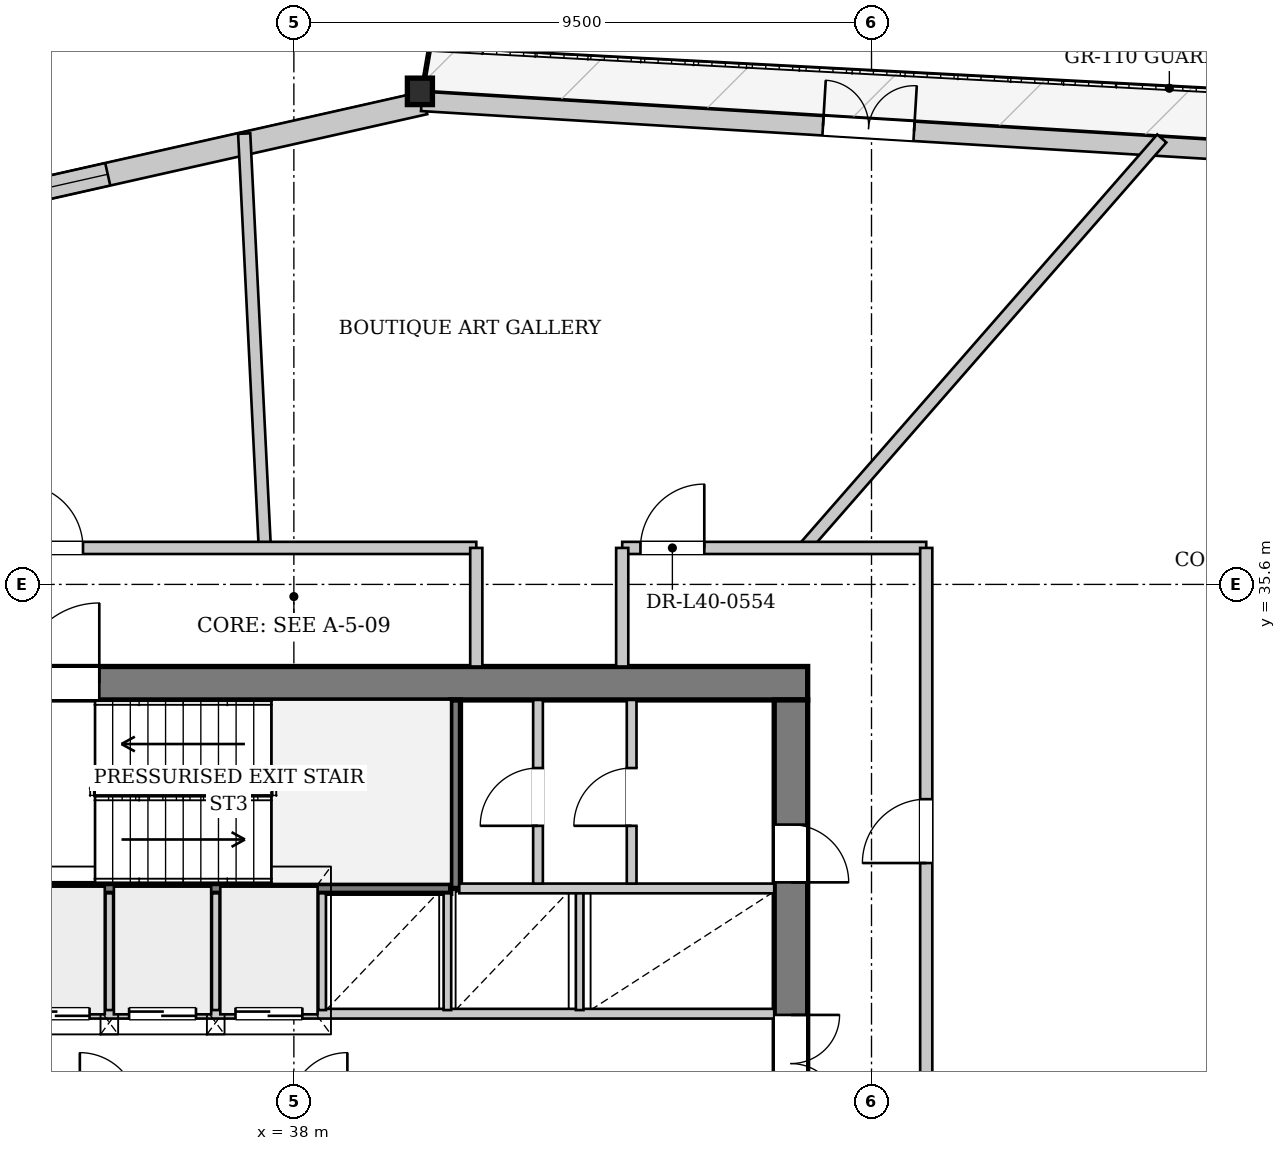
"""IFC4 building model, lengths in metres.
Left out: names, types, materials, properties, quantities, classifications, styles, units other than length and angle.
Written with IfcOpenShell. Run it as: python <this file> out.ifc"""

import sys

from ifc_helpers import new_model, si_unit, direction, frame, frame_2d, origin, origin_2d, place, context, subcontext, project, spatial, rectangle, i_section, extrude, source, transform, mapped, element, fill, save


model = new_model("IFC4")
c1 = context("Model", 3, precision=1e-05, world=origin(), true_north=direction((0.0, 1.0)))
c2 = subcontext(c1, "Body", "Model", "MODEL_VIEW")
j1 = project(units=[si_unit("LENGTHUNIT", "METRE"), si_unit("PLANEANGLEUNIT", "RADIAN")], contexts=[c1])
p1 = place(None, origin())
s1 = spatial("IfcSite", under=j1, at=p1, CompositionType="ELEMENT")
p2 = place(p1, origin())
s2 = spatial("IfcBuilding", under=s1, at=p2, CompositionType="ELEMENT")
p3 = place(p2, frame((0.0, 0.0, 153.7)))
s3 = spatial("IfcBuildingStorey", under=s2, at=p3, CompositionType="ELEMENT", Elevation=153.7)
m1 = source(origin(), c2, "Body", "SweptSolid", [
    extrude(i_section(OverallWidth=0.412, OverallDepth=0.435, WebThickness=0.031, FlangeThickness=0.05, at=origin_2d()), origin(), (0.0, 0.0, 1.0), 3.386),
])
p4 = place(p3, frame((40.11, 43.704, 0.0), z_axis=(-0.022064508815, 0.002667930804, 0.999752989291), x_axis=(-0.120040692713, -0.992768972165, 0.0)))
e1 = element("IfcColumn", 1, at=p4, inside=s3, PredefinedType="COLUMN", context=c2, shape_type="MappedRepresentation", body=[
    mapped(m1, transform((0.0, 0.0, 0.0), x_axis=(1.0, 0.0, 0.0), y_axis=(0.0, 1.0, 0.0), z_axis=(0.0, 0.0, 1.0), scale=1.0)),
])
p5 = place(p3, frame((17.7, 38.464, 0.0), z_axis=(0.0, 0.0, 1.0), x_axis=(0.975581235483, 0.21963891498, 0.0)))
e2 = element("IfcWall", 2, at=p5, inside=s3, PredefinedType="SOLIDWALL", context=c2, shape_type="SweptSolid", body=[
    extrude(rectangle(XDim=23.014, YDim=0.38, at=frame_2d((11.507, 0.0))), origin(), (0.0, 0.0, 1.0), 2.692),
])
p6 = place(p5, frame((5.344, 0.0, 0.322)))
e3 = element("IfcOpeningElement", 3, at=p6, cuts=e2, PredefinedType="OPENING", context=c2, shape_type="SweptSolid", body=[
    extrude(rectangle(XDim=2.2, YDim=2.25, at=frame_2d((1.1, 1.125))), frame((0.0, 0.2, 0.0), z_axis=(0.0, -1.0, 0.0), x_axis=(1.0, 0.0, 0.0)), (0.0, 0.0, 1.0), 0.4),
])
p7 = place(p5, frame((15.47, 0.0, 0.322)))
e4 = element("IfcOpeningElement", 4, at=p7, cuts=e2, PredefinedType="OPENING", context=c2, shape_type="SweptSolid", body=[
    extrude(rectangle(XDim=2.2, YDim=2.25, at=frame_2d((1.1, 1.125))), frame((0.0, 0.2, 0.0), z_axis=(0.0, -1.0, 0.0), x_axis=(1.0, 0.0, 0.0)), (0.0, 0.0, 1.0), 0.4),
])
p8 = place(p3, frame((40.1, 43.544, 0.0), z_axis=(0.0, 0.0, 1.0), x_axis=(0.99815464943, -0.060723107805, 0.0)))
e5 = element("IfcWall", 5, at=p8, inside=s3, PredefinedType="SOLIDWALL", context=c2, shape_type="SweptSolid", body=[
    extrude(rectangle(XDim=23.014, YDim=0.32, at=frame_2d((11.507, 0.0))), origin(), (0.0, 0.0, 1.0), 2.692),
])
p9 = place(p8, frame((6.614, 0.0, 0.0)))
e6 = element("IfcOpeningElement", 6, at=p9, cuts=e5, PredefinedType="OPENING", context=c2, shape_type="SweptSolid", body=[
    extrude(rectangle(XDim=1.5, YDim=2.3, at=frame_2d((0.75, 1.15))), frame((0.0, 0.17, 0.0), z_axis=(0.0, -1.0, 0.0), x_axis=(1.0, 0.0, 0.0)), (0.0, 0.0, 1.0), 0.34),
])
p10 = place(p8, frame((15.73, 0.0, 0.25)))
e7 = element("IfcOpeningElement", 7, at=p10, cuts=e5, PredefinedType="OPENING", context=c2, shape_type="SweptSolid", body=[
    extrude(rectangle(XDim=2.6, YDim=2.35, at=frame_2d((1.3, 1.175))), frame((0.0, 0.17, 0.0), z_axis=(0.0, -1.0, 0.0), x_axis=(1.0, 0.0, 0.0)), (0.0, 0.0, 1.0), 0.34),
])
p11 = place(p3, frame((64.604, 39.268, 0.0), z_axis=(0.0, 0.0, 1.0), x_axis=(-0.501770576444, -0.865000744864, 0.0)))
e8 = element("IfcWall", 8, at=p11, inside=s3, PredefinedType="SOLIDWALL", context=c2, shape_type="SweptSolid", body=[
    extrude(rectangle(XDim=23.598, YDim=0.38, at=frame_2d((11.799, 0.0))), origin(), (0.0, 0.0, 1.0), 2.692),
])
p12 = place(p11, frame((5.507, 0.0, 0.322)))
e9 = element("IfcOpeningElement", 9, at=p12, cuts=e8, PredefinedType="OPENING", context=c2, shape_type="SweptSolid", body=[
    extrude(rectangle(XDim=2.2, YDim=2.25, at=frame_2d((1.1, 1.125))), frame((0.0, 0.2, 0.0), z_axis=(0.0, -1.0, 0.0), x_axis=(1.0, 0.0, 0.0)), (0.0, 0.0, 1.0), 0.4),
])
p13 = place(p11, frame((15.891, 0.0, 0.322)))
e10 = element("IfcOpeningElement", 10, at=p13, cuts=e8, PredefinedType="OPENING", context=c2, shape_type="SweptSolid", body=[
    extrude(rectangle(XDim=2.2, YDim=2.25, at=frame_2d((1.1, 1.125))), frame((0.0, 0.2, 0.0), z_axis=(0.0, -1.0, 0.0), x_axis=(1.0, 0.0, 0.0)), (0.0, 0.0, 1.0), 0.4),
])
p14 = place(p3, frame((29.55, 33.975, 0.0), z_axis=(0.0, 0.0, 1.0), x_axis=(1.0, 0.0, 0.0)))
e11 = element("IfcWall", 11, at=p14, inside=s3, PredefinedType="SHEAR", context=c2, shape_type="SweptSolid", body=[
    extrude(rectangle(XDim=16.9, YDim=0.55, at=frame_2d((8.45, 0.0))), origin(), (0.0, 0.0, 1.0), 3.3),
])
p15 = place(p14, frame((1.55, 0.0, 0.0)))
e12 = element("IfcOpeningElement", 12, at=p15, cuts=e11, PredefinedType="OPENING", context=c2, shape_type="SweptSolid", body=[
    extrude(rectangle(XDim=0.95, YDim=2.1, at=frame_2d((0.475, 1.05))), frame((0.0, 0.285, 0.0), z_axis=(0.0, -1.0, 0.0), x_axis=(1.0, 0.0, 0.0)), (0.0, 0.0, 1.0), 0.57),
])
p16 = place(p14, frame((3.93, 0.0, 0.0)))
e13 = element("IfcOpeningElement", 13, at=p16, cuts=e11, PredefinedType="OPENING", context=c2, shape_type="SweptSolid", body=[
    extrude(rectangle(XDim=1.32, YDim=2.2, at=frame_2d((0.66, 1.1))), frame((0.0, 0.285, 0.0), z_axis=(0.0, -1.0, 0.0), x_axis=(1.0, 0.0, 0.0)), (0.0, 0.0, 1.0), 0.57),
])
p17 = place(p3, frame((46.175, 33.7, 0.0), z_axis=(0.0, 0.0, 1.0), x_axis=(0.0, -1.0, 0.0)))
e14 = element("IfcWall", 14, at=p17, inside=s3, PredefinedType="SHEAR", context=c2, shape_type="SweptSolid", body=[
    extrude(rectangle(XDim=14.2, YDim=0.55, at=frame_2d((7.1, 0.0))), origin(), (0.0, 0.0, 1.0), 3.3),
])
p18 = place(p17, frame((5.18, 0.0, 0.0)))
e15 = element("IfcOpeningElement", 15, at=p18, cuts=e14, PredefinedType="OPENING", context=c2, shape_type="SweptSolid", body=[
    extrude(rectangle(XDim=1.6, YDim=2.2, at=frame_2d((0.8, 1.1))), frame((0.0, 0.285, 0.0), z_axis=(0.0, -1.0, 0.0), x_axis=(1.0, 0.0, 0.0)), (0.0, 0.0, 1.0), 0.57),
])
p19 = place(p17, frame((2.05, 0.0, 0.0)))
e16 = element("IfcOpeningElement", 16, at=p19, cuts=e14, PredefinedType="OPENING", context=c2, shape_type="SweptSolid", body=[
    extrude(rectangle(XDim=0.95, YDim=2.1, at=frame_2d((0.475, 1.05))), frame((0.0, 0.285, 0.0), z_axis=(0.0, -1.0, 0.0), x_axis=(1.0, 0.0, 0.0)), (0.0, 0.0, 1.0), 0.57),
])
p20 = place(p3, frame((33.28, 30.6, 0.0), z_axis=(0.0, 0.0, 1.0), x_axis=(1.0, 0.0, 0.0)))
e17 = element("IfcWall", 17, at=p20, inside=s3, PredefinedType="PARTITIONING", context=c2, shape_type="SweptSolid", body=[
    extrude(rectangle(XDim=7.3, YDim=0.16, at=frame_2d((3.65, 0.0))), origin(), (0.0, 0.0, 1.0), 3.3),
])
p21 = place(p3, frame((40.66, 30.6, 0.0), z_axis=(0.0, 0.0, 1.0), x_axis=(0.0, 1.0, 0.0)))
e18 = element("IfcWall", 18, at=p21, inside=s3, PredefinedType="PARTITIONING", context=c2, shape_type="SweptSolid", body=[
    extrude(rectangle(XDim=3.1, YDim=0.16, at=frame_2d((1.55, 0.0))), origin(), (0.0, 0.0, 1.0), 3.3),
])
p22 = place(p3, frame((33.28, 28.54, 0.0), z_axis=(0.0, 0.0, 1.0), x_axis=(1.0, 0.0, 0.0)))
e19 = element("IfcWall", 19, at=p22, inside=s3, PredefinedType="PARTITIONING", context=c2, shape_type="SweptSolid", body=[
    extrude(rectangle(XDim=12.62, YDim=0.16, at=frame_2d((6.31, 0.0))), origin(), (0.0, 0.0, 1.0), 3.3),
])
p23 = place(p22, frame((0.26, 0.0, 0.0)))
e20 = element("IfcOpeningElement", 20, at=p23, cuts=e19, PredefinedType="OPENING", context=c2, shape_type="SweptSolid", body=[
    extrude(rectangle(XDim=1.1, YDim=2.2, at=frame_2d((0.55, 1.1))), frame((0.0, 0.09, 0.0), z_axis=(0.0, -1.0, 0.0), x_axis=(1.0, 0.0, 0.0)), (0.0, 0.0, 1.0), 0.18),
])
p24 = place(p22, frame((2.01, 0.0, 0.0)))
e21 = element("IfcOpeningElement", 21, at=p24, cuts=e19, PredefinedType="OPENING", context=c2, shape_type="SweptSolid", body=[
    extrude(rectangle(XDim=1.1, YDim=2.2, at=frame_2d((0.55, 1.1))), frame((0.0, 0.09, 0.0), z_axis=(0.0, -1.0, 0.0), x_axis=(1.0, 0.0, 0.0)), (0.0, 0.0, 1.0), 0.18),
])
p25 = place(p22, frame((3.76, 0.0, 0.0)))
e22 = element("IfcOpeningElement", 22, at=p25, cuts=e19, PredefinedType="OPENING", context=c2, shape_type="SweptSolid", body=[
    extrude(rectangle(XDim=1.1, YDim=2.2, at=frame_2d((0.55, 1.1))), frame((0.0, 0.09, 0.0), z_axis=(0.0, -1.0, 0.0), x_axis=(1.0, 0.0, 0.0)), (0.0, 0.0, 1.0), 0.18),
])
p26 = place(p3, frame((40.72, 30.6, 0.0), z_axis=(0.0, 0.0, 1.0), x_axis=(1.0, 0.0, 0.0)))
e23 = element("IfcWall", 23, at=p26, inside=s3, PredefinedType="PARTITIONING", context=c2, shape_type="SweptSolid", body=[
    extrude(rectangle(XDim=5.18, YDim=0.16, at=frame_2d((2.59, 0.0))), origin(), (0.0, 0.0, 1.0), 3.3),
])
for number, where, z_axis, x_axis in (
    (24, (34.965, 28.6, 0.0), (0.0, 0.0, 1.0), (0.0, 1.0, 0.0)),
    (25, (36.715, 28.6, 0.0), (0.0, 0.0, 1.0), (0.0, 1.0, 0.0)),
    (26, (38.465, 28.6, 0.0), (0.0, 0.0, 1.0), (0.0, 1.0, 0.0)),
    (27, (40.525, 28.6, 0.0), (0.0, 0.0, 1.0), (0.0, 1.0, 0.0)),
    (28, (42.7, 28.6, 0.0), (0.0, 0.0, 1.0), (0.0, 1.0, 0.0)),
):
    element("IfcWall", number, at=place(p3, frame(where, z_axis=z_axis, x_axis=x_axis)), inside=s3, PredefinedType="PARTITIONING", context=c2, shape_type="SweptSolid", body=[
        extrude(rectangle(XDim=1.92, YDim=0.125, at=frame_2d((0.96, 0.0))), origin(), (0.0, 0.0, 1.0), 3.3),
    ])
p27 = place(p3, frame((42.015, 30.68, 0.0), z_axis=(0.0, 0.0, 1.0), x_axis=(0.0, 1.0, 0.0)))
e29 = element("IfcWall", 29, at=p27, inside=s3, PredefinedType="PARTITIONING", context=c2, shape_type="SweptSolid", body=[
    extrude(rectangle(XDim=3.02, YDim=0.16, at=frame_2d((1.51, 0.0))), origin(), (0.0, 0.0, 1.0), 3.3),
])
p28 = place(p27, frame((0.95, 0.0, 0.0)))
e30 = element("IfcOpeningElement", 30, at=p28, cuts=e29, PredefinedType="OPENING", context=c2, shape_type="SweptSolid", body=[
    extrude(rectangle(XDim=0.95, YDim=2.1, at=frame_2d((0.475, 1.05))), frame((0.0, 0.09, 0.0), z_axis=(0.0, -1.0, 0.0), x_axis=(1.0, 0.0, 0.0)), (0.0, 0.0, 1.0), 0.18),
])
p29 = place(p3, frame((43.555, 30.68, 0.0), z_axis=(0.0, 0.0, 1.0), x_axis=(0.0, 1.0, 0.0)))
e31 = element("IfcWall", 31, at=p29, inside=s3, PredefinedType="PARTITIONING", context=c2, shape_type="SweptSolid", body=[
    extrude(rectangle(XDim=3.02, YDim=0.16, at=frame_2d((1.51, 0.0))), origin(), (0.0, 0.0, 1.0), 3.3),
])
p30 = place(p29, frame((0.95, 0.0, 0.0)))
e32 = element("IfcOpeningElement", 32, at=p30, cuts=e31, PredefinedType="OPENING", context=c2, shape_type="SweptSolid", body=[
    extrude(rectangle(XDim=0.95, YDim=2.1, at=frame_2d((0.475, 1.05))), frame((0.0, 0.09, 0.0), z_axis=(0.0, -1.0, 0.0), x_axis=(1.0, 0.0, 0.0)), (0.0, 0.0, 1.0), 0.18),
])
p31 = place(p3, frame((46.389, 36.2, 0.0), z_axis=(0.0, 0.0, 1.0), x_axis=(0.658021279413, 0.752999333227, 0.0)))
e33 = element("IfcWall", 33, at=p31, inside=s3, PredefinedType="PARTITIONING", context=c2, shape_type="SweptSolid", body=[
    extrude(rectangle(XDim=8.943, YDim=0.2, at=frame_2d((4.471, 0.0))), origin(), (0.0, 0.0, 1.0), 3.3),
])
p32 = place(p3, frame((37.522, 36.2, 0.0), z_axis=(0.0, 0.0, 1.0), x_axis=(-0.049741288748, 0.998762135943, 0.0)))
e34 = element("IfcWall", 34, at=p32, inside=s3, PredefinedType="PARTITIONING", context=c2, shape_type="SweptSolid", body=[
    extrude(rectangle(XDim=6.823, YDim=0.2, at=frame_2d((3.411, 0.0))), origin(), (0.0, 0.0, 1.0), 3.3),
])
p33 = place(p3, frame((27.6, 36.2, 0.0), z_axis=(0.0, 0.0, 1.0), x_axis=(1.0, 0.0, 0.0)))
e35 = element("IfcWall", 35, at=p33, inside=s3, PredefinedType="PARTITIONING", context=c2, shape_type="SweptSolid", body=[
    extrude(rectangle(XDim=13.4, YDim=0.2, at=frame_2d((6.7, 0.0))), origin(), (0.0, 0.0, 1.0), 3.3),
])
p34 = place(p33, frame((5.882, 0.0, 0.0)))
e36 = element("IfcOpeningElement", 36, at=p34, cuts=e35, PredefinedType="OPENING", context=c2, shape_type="SweptSolid", body=[
    extrude(rectangle(XDim=1.05, YDim=2.2, at=frame_2d((0.525, 1.1))), frame((0.0, 0.11, 0.0), z_axis=(0.0, -1.0, 0.0), x_axis=(1.0, 0.0, 0.0)), (0.0, 0.0, 1.0), 0.22),
])
p35 = place(p3, frame((41.0, 34.25, 0.0), z_axis=(0.0, 0.0, 1.0), x_axis=(0.0, 1.0, 0.0)))
e37 = element("IfcWall", 37, at=p35, inside=s3, PredefinedType="PARTITIONING", context=c2, shape_type="SweptSolid", body=[
    extrude(rectangle(XDim=1.95, YDim=0.2, at=frame_2d((0.975, 0.0))), origin(), (0.0, 0.0, 1.0), 3.3),
])
p36 = place(p3, frame((43.4, 36.2, 0.0), z_axis=(0.0, 0.0, 1.0), x_axis=(1.0, 0.0, 0.0)))
e38 = element("IfcWall", 38, at=p36, inside=s3, PredefinedType="PARTITIONING", context=c2, shape_type="SweptSolid", body=[
    extrude(rectangle(XDim=5.0, YDim=0.2, at=frame_2d((2.5, 0.0))), origin(), (0.0, 0.0, 1.0), 3.3),
])
p37 = place(p36, frame((0.3, 0.0, 0.0)))
e39 = element("IfcOpeningElement", 39, at=p37, cuts=e38, PredefinedType="OPENING", context=c2, shape_type="SweptSolid", body=[
    extrude(rectangle(XDim=1.05, YDim=2.2, at=frame_2d((0.525, 1.1))), frame((0.0, 0.11, 0.0), z_axis=(0.0, -1.0, 0.0), x_axis=(1.0, 0.0, 0.0)), (0.0, 0.0, 1.0), 0.22),
])
p38 = place(p3, frame((43.4, 34.25, 0.0), z_axis=(0.0, 0.0, 1.0), x_axis=(0.0, 1.0, 0.0)))
e40 = element("IfcWall", 40, at=p38, inside=s3, PredefinedType="PARTITIONING", context=c2, shape_type="SweptSolid", body=[
    extrude(rectangle(XDim=1.95, YDim=0.2, at=frame_2d((0.975, 0.0))), origin(), (0.0, 0.0, 1.0), 3.3),
])
p39 = place(p3, frame((48.4, 17.0, 0.0), z_axis=(0.0, 0.0, 1.0), x_axis=(0.0, 1.0, 0.0)))
e41 = element("IfcWall", 41, at=p39, inside=s3, PredefinedType="PARTITIONING", context=c2, shape_type="SweptSolid", body=[
    extrude(rectangle(XDim=19.2, YDim=0.2, at=frame_2d((9.6, 0.0))), origin(), (0.0, 0.0, 1.0), 3.3),
])
p40 = place(p39, frame((3.695, 0.0, 0.0)))
e42 = element("IfcOpeningElement", 42, at=p40, cuts=e41, PredefinedType="OPENING", context=c2, shape_type="SweptSolid", body=[
    extrude(rectangle(XDim=1.05, YDim=2.2, at=frame_2d((0.525, 1.1))), frame((0.0, 0.11, 0.0), z_axis=(0.0, -1.0, 0.0), x_axis=(1.0, 0.0, 0.0)), (0.0, 0.0, 1.0), 0.22),
])
p41 = place(p39, frame((14.018, 0.0, 0.0)))
e43 = element("IfcOpeningElement", 43, at=p41, cuts=e41, PredefinedType="OPENING", context=c2, shape_type="SweptSolid", body=[
    extrude(rectangle(XDim=1.05, YDim=2.2, at=frame_2d((0.525, 1.1))), frame((0.0, 0.11, 0.0), z_axis=(0.0, -1.0, 0.0), x_axis=(1.0, 0.0, 0.0)), (0.0, 0.0, 1.0), 0.22),
])
m2 = source(origin(), c2, "Body", "SweptSolid", [
    extrude(rectangle(XDim=2.2, YDim=2.25, at=frame_2d((1.1, 1.125))), frame((0.0, 0.03, 0.0), z_axis=(0.0, -1.0, 0.0), x_axis=(1.0, 0.0, 0.0)), (0.0, 0.0, 1.0), 0.06),
])
p42 = place(p7, origin())
e44 = element("IfcWindow", 44, at=p42, inside=s3, PartitioningType="SINGLE_PANEL", PredefinedType="WINDOW", context=c2, shape_type="MappedRepresentation", body=[
    mapped(m2, transform((0.0, 0.0, 0.0), x_axis=(1.0, 0.0, 0.0), y_axis=(0.0, 1.0, 0.0), z_axis=(0.0, 0.0, 1.0), scale=1.0)),
])
fill(e4, e44)
m3 = source(origin(), c2, "Body", "SweptSolid", [
    extrude(rectangle(XDim=1.5, YDim=2.3, at=frame_2d((0.75, 1.15))), frame((0.0, 0.025, 0.0), z_axis=(0.0, -1.0, 0.0), x_axis=(1.0, 0.0, 0.0)), (0.0, 0.0, 1.0), 0.05),
])
p43 = place(p9, origin())
e45 = element("IfcDoor", 45, at=p43, inside=s3, OperationType="DOUBLE_DOOR_SINGLE_SWING", PredefinedType="DOOR", context=c2, shape_type="MappedRepresentation", body=[
    mapped(m3, transform((0.0, 0.0, 0.0), x_axis=(1.0, 0.0, 0.0), y_axis=(0.0, 1.0, 0.0), z_axis=(0.0, 0.0, 1.0), scale=1.0)),
])
fill(e6, e45)
m4 = source(origin(), c2, "Body", "SweptSolid", [
    extrude(rectangle(XDim=1.32, YDim=2.2, at=frame_2d((0.66, 1.1))), frame((0.0, 0.025, 0.0), z_axis=(0.0, -1.0, 0.0), x_axis=(1.0, 0.0, 0.0)), (0.0, 0.0, 1.0), 0.05),
])
p44 = place(p16, origin())
e46 = element("IfcDoor", 46, at=p44, inside=s3, OperationType="SINGLE_SWING_RIGHT", PredefinedType="DOOR", context=c2, shape_type="MappedRepresentation", body=[
    mapped(m4, transform((0.0, 0.0, 0.0), x_axis=(1.0, 0.0, 0.0), y_axis=(0.0, 1.0, 0.0), z_axis=(0.0, 0.0, 1.0), scale=1.0)),
])
fill(e13, e46)
m5 = source(origin(), c2, "Body", "SweptSolid", [
    extrude(rectangle(XDim=1.6, YDim=2.2, at=frame_2d((0.8, 1.1))), frame((0.0, 0.025, 0.0), z_axis=(0.0, -1.0, 0.0), x_axis=(1.0, 0.0, 0.0)), (0.0, 0.0, 1.0), 0.05),
])
p45 = place(p18, origin())
e47 = element("IfcDoor", 47, at=p45, inside=s3, OperationType="DOUBLE_DOOR_SINGLE_SWING", PredefinedType="DOOR", context=c2, shape_type="MappedRepresentation", body=[
    mapped(m5, transform((0.0, 0.0, 0.0), x_axis=(1.0, 0.0, 0.0), y_axis=(0.0, 1.0, 0.0), z_axis=(0.0, 0.0, 1.0), scale=1.0)),
])
fill(e15, e47)
m6 = source(origin(), c2, "Body", "SweptSolid", [
    extrude(rectangle(XDim=1.1, YDim=2.2, at=frame_2d((0.55, 1.1))), frame((0.0, 0.025, 0.0), z_axis=(0.0, -1.0, 0.0), x_axis=(1.0, 0.0, 0.0)), (0.0, 0.0, 1.0), 0.05),
])
p46 = place(p23, origin())
e48 = element("IfcDoor", 48, at=p46, inside=s3, OperationType="DOUBLE_DOOR_SLIDING", PredefinedType="DOOR", context=c2, shape_type="MappedRepresentation", body=[
    mapped(m6, transform((0.0, 0.0, 0.0), x_axis=(1.0, 0.0, 0.0), y_axis=(0.0, 1.0, 0.0), z_axis=(0.0, 0.0, 1.0), scale=1.0)),
])
fill(e20, e48)
p47 = place(p24, origin())
e49 = element("IfcDoor", 49, at=p47, inside=s3, OperationType="DOUBLE_DOOR_SLIDING", PredefinedType="DOOR", context=c2, shape_type="MappedRepresentation", body=[
    mapped(m6, transform((0.0, 0.0, 0.0), x_axis=(1.0, 0.0, 0.0), y_axis=(0.0, 1.0, 0.0), z_axis=(0.0, 0.0, 1.0), scale=1.0)),
])
fill(e21, e49)
p48 = place(p25, origin())
e50 = element("IfcDoor", 50, at=p48, inside=s3, OperationType="DOUBLE_DOOR_SLIDING", PredefinedType="DOOR", context=c2, shape_type="MappedRepresentation", body=[
    mapped(m6, transform((0.0, 0.0, 0.0), x_axis=(1.0, 0.0, 0.0), y_axis=(0.0, 1.0, 0.0), z_axis=(0.0, 0.0, 1.0), scale=1.0)),
])
fill(e22, e50)
m7 = source(origin(), c2, "Body", "SweptSolid", [
    extrude(rectangle(XDim=0.95, YDim=2.1, at=frame_2d((0.475, 1.05))), frame((0.0, 0.025, 0.0), z_axis=(0.0, -1.0, 0.0), x_axis=(1.0, 0.0, 0.0)), (0.0, 0.0, 1.0), 0.05),
])
p49 = place(p28, origin())
e51 = element("IfcDoor", 51, at=p49, inside=s3, OperationType="SINGLE_SWING_LEFT", PredefinedType="DOOR", context=c2, shape_type="MappedRepresentation", body=[
    mapped(m7, transform((0.0, 0.0, 0.0), x_axis=(1.0, 0.0, 0.0), y_axis=(0.0, 1.0, 0.0), z_axis=(0.0, 0.0, 1.0), scale=1.0)),
])
fill(e30, e51)
p50 = place(p30, origin())
e52 = element("IfcDoor", 52, at=p50, inside=s3, OperationType="SINGLE_SWING_LEFT", PredefinedType="DOOR", context=c2, shape_type="MappedRepresentation", body=[
    mapped(m7, transform((0.0, 0.0, 0.0), x_axis=(1.0, 0.0, 0.0), y_axis=(0.0, 1.0, 0.0), z_axis=(0.0, 0.0, 1.0), scale=1.0)),
])
fill(e32, e52)
p51 = place(p19, origin())
e53 = element("IfcDoor", 53, at=p51, inside=s3, OperationType="SINGLE_SWING_RIGHT", PredefinedType="DOOR", context=c2, shape_type="MappedRepresentation", body=[
    mapped(m7, transform((0.0, 0.0, 0.0), x_axis=(1.0, 0.0, 0.0), y_axis=(0.0, 1.0, 0.0), z_axis=(0.0, 0.0, 1.0), scale=1.0)),
])
fill(e16, e53)
m8 = source(origin(), c2, "Body", "SweptSolid", [
    extrude(rectangle(XDim=1.05, YDim=2.2, at=frame_2d((0.525, 1.1))), frame((0.0, 0.025, 0.0), z_axis=(0.0, -1.0, 0.0), x_axis=(1.0, 0.0, 0.0)), (0.0, 0.0, 1.0), 0.05),
])
p52 = place(p34, origin())
e54 = element("IfcDoor", 54, at=p52, inside=s3, OperationType="SINGLE_SWING_LEFT", PredefinedType="DOOR", context=c2, shape_type="MappedRepresentation", body=[
    mapped(m8, transform((0.0, 0.0, 0.0), x_axis=(1.0, 0.0, 0.0), y_axis=(0.0, 1.0, 0.0), z_axis=(0.0, 0.0, 1.0), scale=1.0)),
])
fill(e36, e54)
p53 = place(p37, origin())
e55 = element("IfcDoor", 55, at=p53, inside=s3, OperationType="SINGLE_SWING_RIGHT", PredefinedType="DOOR", context=c2, shape_type="MappedRepresentation", body=[
    mapped(m8, transform((0.0, 0.0, 0.0), x_axis=(1.0, 0.0, 0.0), y_axis=(0.0, 1.0, 0.0), z_axis=(0.0, 0.0, 1.0), scale=1.0)),
])
fill(e39, e55)
p54 = place(p41, origin())
e56 = element("IfcDoor", 56, at=p54, inside=s3, OperationType="SINGLE_SWING_LEFT", PredefinedType="DOOR", context=c2, shape_type="MappedRepresentation", body=[
    mapped(m8, transform((0.0, 0.0, 0.0), x_axis=(1.0, 0.0, 0.0), y_axis=(0.0, 1.0, 0.0), z_axis=(0.0, 0.0, 1.0), scale=1.0)),
])
fill(e43, e56)
save(model, sys.argv[1])
